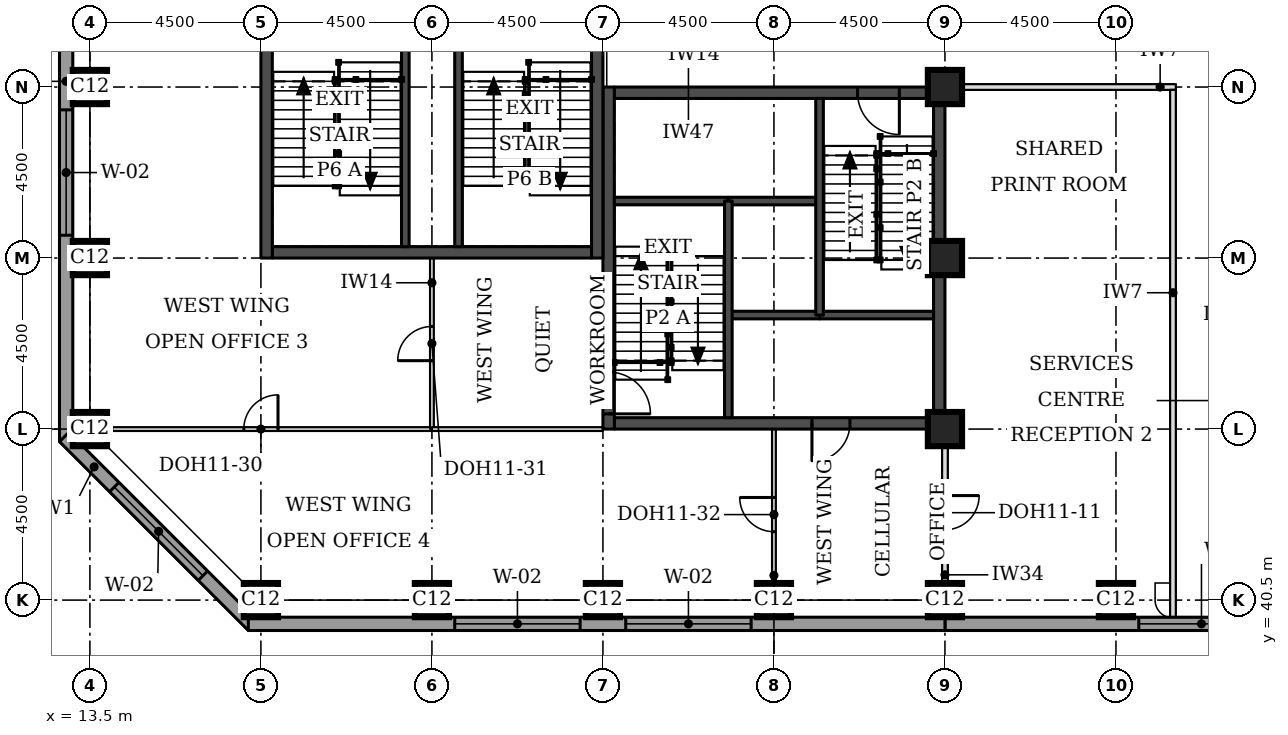
"""IFC4 building model, lengths in metres.
Left out: names, types, materials, properties, quantities, classifications, styles, units other than length and angle.
Written with IfcOpenShell. Run it as: python <this file> out.ifc"""

import sys

from ifc_helpers import new_model, si_unit, direction, frame, frame_2d, origin, origin_2d, place, context, subcontext, project, spatial, rectangle, extrude, element, fill, save


model = new_model("IFC4")
c1 = context("Model", 3, precision=1e-05, world=origin(), true_north=direction((0.0, 1.0)))
c2 = subcontext(c1, "Body", "Model", "MODEL_VIEW")
j1 = project(units=[si_unit("LENGTHUNIT", "METRE"), si_unit("PLANEANGLEUNIT", "RADIAN")], contexts=[c1])
p1 = place(None, origin())
s1 = spatial("IfcSite", under=j1, at=p1, CompositionType="ELEMENT")
p2 = place(p1, origin())
s2 = spatial("IfcBuilding", under=s1, at=p2, CompositionType="ELEMENT")
p3 = place(p2, frame((0.0, 0.0, 234.1)))
s3 = spatial("IfcBuildingStorey", under=s2, at=p3, CompositionType="ELEMENT", Elevation=234.1)
for number, where, z_axis, x_axis in (
    (1, (18.0, 40.5, 0.0), (0.0, 0.0, 1.0), (1.0, 0.0, 0.0)),
    (2, (22.5, 40.5, 0.0), (0.0, 0.0, 1.0), (1.0, 0.0, 0.0)),
    (3, (27.0, 40.5, 0.0), (0.0, 0.0, 1.0), (1.0, 0.0, 0.0)),
    (4, (31.5, 40.5, 0.0), (0.0, 0.0, 1.0), (1.0, 0.0, 0.0)),
    (5, (36.0, 40.5, 0.0), (0.0, 0.0, 1.0), (1.0, 0.0, 0.0)),
    (6, (40.5, 40.5, 0.0), (0.0, 0.0, 1.0), (1.0, 0.0, 0.0)),
    (7, (13.5, 45.0, 0.0), (0.0, 0.0, 1.0), (1.0, 0.0, 0.0)),
    (8, (36.0, 45.0, 0.0), (0.0, 0.0, 1.0), (1.0, 0.0, 0.0)),
    (9, (13.5, 49.5, 0.0), (0.0, 0.0, 1.0), (1.0, 0.0, 0.0)),
    (10, (36.0, 49.5, 0.0), (0.0, 0.0, 1.0), (1.0, 0.0, 0.0)),
    (11, (13.5, 54.0, 0.0), (0.0, 0.0, 1.0), (1.0, 0.0, 0.0)),
    (12, (36.0, 54.0, 0.0), (0.0, 0.0, 1.0), (1.0, 0.0, 0.0)),
):
    element("IfcColumn", number, at=place(p3, frame(where, z_axis=z_axis, x_axis=x_axis)), inside=s3, PredefinedType="COLUMN", context=c2, shape_type="SweptSolid", body=[
        extrude(rectangle(XDim=0.9, YDim=0.9, at=origin_2d()), origin(), (0.0, 0.0, 1.0), 3.7),
    ])
p4 = place(p3, frame((27.3, 45.15, 0.0), z_axis=(0.0, 0.0, 1.0), x_axis=(1.0, 0.0, 0.0)))
e13 = element("IfcWall", 13, at=p4, inside=s3, PredefinedType="SHEAR", context=c2, shape_type="SweptSolid", body=[
    extrude(rectangle(XDim=8.4, YDim=0.3, at=frame_2d((4.2, 0.0))), origin(), (0.0, 0.0, 1.0), 3.7),
])
p5 = place(p4, frame((5.2, 0.0, 0.0)))
e14 = element("IfcOpeningElement", 14, at=p5, cuts=e13, PredefinedType="OPENING", context=c2, shape_type="SweptSolid", body=[
    extrude(rectangle(XDim=1.0, YDim=2.1, at=frame_2d((0.5, 1.05))), frame((0.0, 0.16, 0.0), z_axis=(0.0, -1.0, 0.0), x_axis=(1.0, 0.0, 0.0)), (0.0, 0.0, 1.0), 0.32),
])
p6 = place(p3, frame((27.3, 53.85, 0.0), z_axis=(0.0, 0.0, 1.0), x_axis=(1.0, 0.0, 0.0)))
e15 = element("IfcWall", 15, at=p6, inside=s3, PredefinedType="SHEAR", context=c2, shape_type="SweptSolid", body=[
    extrude(rectangle(XDim=8.4, YDim=0.3, at=frame_2d((4.2, 0.0))), origin(), (0.0, 0.0, 1.0), 3.7),
])
p7 = place(p6, frame((6.4, 0.0, 0.0)))
e16 = element("IfcOpeningElement", 16, at=p7, cuts=e15, PredefinedType="OPENING", context=c2, shape_type="SweptSolid", body=[
    extrude(rectangle(XDim=1.1, YDim=2.1, at=frame_2d((0.55, 1.05))), frame((0.0, 0.16, 0.0), z_axis=(0.0, -1.0, 0.0), x_axis=(1.0, 0.0, 0.0)), (0.0, 0.0, 1.0), 0.32),
])
p8 = place(p3, frame((27.15, 45.0, 0.0), z_axis=(0.0, 0.0, 1.0), x_axis=(0.0, 1.0, 0.0)))
e17 = element("IfcWall", 17, at=p8, inside=s3, PredefinedType="SHEAR", context=c2, shape_type="SweptSolid", body=[
    extrude(rectangle(XDim=9.0, YDim=0.3, at=frame_2d((4.5, 0.0))), origin(), (0.0, 0.0, 1.0), 3.7),
])
p9 = place(p8, frame((0.4, 0.0, 0.0)))
e18 = element("IfcOpeningElement", 18, at=p9, cuts=e17, PredefinedType="OPENING", context=c2, shape_type="SweptSolid", body=[
    extrude(rectangle(XDim=1.1, YDim=2.1, at=frame_2d((0.55, 1.05))), frame((0.0, 0.16, 0.0), z_axis=(0.0, -1.0, 0.0), x_axis=(1.0, 0.0, 0.0)), (0.0, 0.0, 1.0), 0.32),
])
p10 = place(p3, frame((35.85, 45.0, 0.0), z_axis=(0.0, 0.0, 1.0), x_axis=(0.0, 1.0, 0.0)))
e19 = element("IfcWall", 19, at=p10, inside=s3, PredefinedType="SHEAR", context=c2, shape_type="SweptSolid", body=[
    extrude(rectangle(XDim=9.0, YDim=0.3, at=frame_2d((4.5, 0.0))), origin(), (0.0, 0.0, 1.0), 3.7),
])
p11 = place(p3, frame((18.3, 49.65, 0.0), z_axis=(0.0, 0.0, 1.0), x_axis=(1.0, 0.0, 0.0)))
e20 = element("IfcWall", 20, at=p11, inside=s3, PredefinedType="SHEAR", context=c2, shape_type="SweptSolid", body=[
    extrude(rectangle(XDim=8.4, YDim=0.3, at=frame_2d((4.2, 0.0))), origin(), (0.0, 0.0, 1.0), 3.7),
])
p12 = place(p3, frame((18.15, 49.5, 0.0), z_axis=(0.0, 0.0, 1.0), x_axis=(0.0, 1.0, 0.0)))
e21 = element("IfcWall", 21, at=p12, inside=s3, PredefinedType="SHEAR", context=c2, shape_type="SweptSolid", body=[
    extrude(rectangle(XDim=9.0, YDim=0.3, at=frame_2d((4.5, 0.0))), origin(), (0.0, 0.0, 1.0), 3.7),
])
p13 = place(p3, frame((26.85, 49.5, 0.0), z_axis=(0.0, 0.0, 1.0), x_axis=(0.0, 1.0, 0.0)))
e22 = element("IfcWall", 22, at=p13, inside=s3, PredefinedType="SHEAR", context=c2, shape_type="SweptSolid", body=[
    extrude(rectangle(XDim=9.0, YDim=0.3, at=frame_2d((4.5, 0.0))), origin(), (0.0, 0.0, 1.0), 3.7),
])
p14 = place(p13, frame((6.6, 0.0, 0.0)))
e23 = element("IfcOpeningElement", 23, at=p14, cuts=e22, PredefinedType="OPENING", context=c2, shape_type="SweptSolid", body=[
    extrude(rectangle(XDim=1.8, YDim=2.1, at=frame_2d((0.9, 1.05))), frame((0.0, 0.16, 0.0), z_axis=(0.0, -1.0, 0.0), x_axis=(1.0, 0.0, 0.0)), (0.0, 0.0, 1.0), 0.32),
])
p15 = place(p3, frame((36.0, 39.875, 0.0), z_axis=(0.0, 0.0, 1.0), x_axis=(1.0, 0.0, 0.0)))
e24 = element("IfcWall", 24, at=p15, inside=s3, PredefinedType="STANDARD", context=c2, shape_type="SweptSolid", body=[
    extrude(rectangle(XDim=36.331, YDim=0.35, at=frame_2d((18.166, 0.0))), origin(), (0.0, 0.0, 1.0), 3.525),
])
p16 = place(p15, frame((5.1, 0.0, 0.9)))
e25 = element("IfcOpeningElement", 25, at=p16, cuts=e24, PredefinedType="OPENING", context=c2, shape_type="SweptSolid", body=[
    extrude(rectangle(XDim=3.3, YDim=1.9, at=frame_2d((1.65, 0.95))), frame((0.0, 0.185, 0.0), z_axis=(0.0, -1.0, 0.0), x_axis=(1.0, 0.0, 0.0)), (0.0, 0.0, 1.0), 0.37),
])
p17 = place(p15, frame((9.6, 0.0, 0.9)))
e26 = element("IfcOpeningElement", 26, at=p17, cuts=e24, PredefinedType="OPENING", context=c2, shape_type="SweptSolid", body=[
    extrude(rectangle(XDim=3.3, YDim=1.9, at=frame_2d((1.65, 0.95))), frame((0.0, 0.185, 0.0), z_axis=(0.0, -1.0, 0.0), x_axis=(1.0, 0.0, 0.0)), (0.0, 0.0, 1.0), 0.37),
])
p18 = place(p15, frame((14.1, 0.0, 0.9)))
e27 = element("IfcOpeningElement", 27, at=p18, cuts=e24, PredefinedType="OPENING", context=c2, shape_type="SweptSolid", body=[
    extrude(rectangle(XDim=3.3, YDim=1.9, at=frame_2d((1.65, 0.95))), frame((0.0, 0.185, 0.0), z_axis=(0.0, -1.0, 0.0), x_axis=(1.0, 0.0, 0.0)), (0.0, 0.0, 1.0), 0.37),
])
p19 = place(p15, frame((18.6, 0.0, 0.9)))
e28 = element("IfcOpeningElement", 28, at=p19, cuts=e24, PredefinedType="OPENING", context=c2, shape_type="SweptSolid", body=[
    extrude(rectangle(XDim=3.3, YDim=1.9, at=frame_2d((1.65, 0.95))), frame((0.0, 0.185, 0.0), z_axis=(0.0, -1.0, 0.0), x_axis=(1.0, 0.0, 0.0)), (0.0, 0.0, 1.0), 0.37),
])
p20 = place(p15, frame((23.1, 0.0, 0.9)))
e29 = element("IfcOpeningElement", 29, at=p20, cuts=e24, PredefinedType="OPENING", context=c2, shape_type="SweptSolid", body=[
    extrude(rectangle(XDim=3.3, YDim=1.9, at=frame_2d((1.65, 0.95))), frame((0.0, 0.185, 0.0), z_axis=(0.0, -1.0, 0.0), x_axis=(1.0, 0.0, 0.0)), (0.0, 0.0, 1.0), 0.37),
])
p21 = place(p15, frame((27.6, 0.0, 0.9)))
e30 = element("IfcOpeningElement", 30, at=p21, cuts=e24, PredefinedType="OPENING", context=c2, shape_type="SweptSolid", body=[
    extrude(rectangle(XDim=3.3, YDim=1.9, at=frame_2d((1.65, 0.95))), frame((0.0, 0.185, 0.0), z_axis=(0.0, -1.0, 0.0), x_axis=(1.0, 0.0, 0.0)), (0.0, 0.0, 1.0), 0.37),
])
p22 = place(p3, frame((12.875, 58.831, 0.0), z_axis=(0.0, 0.0, 1.0), x_axis=(0.0, -1.0, 0.0)))
e31 = element("IfcWall", 31, at=p22, inside=s3, PredefinedType="STANDARD", context=c2, shape_type="SweptSolid", body=[
    extrude(rectangle(XDim=14.163, YDim=0.35, at=frame_2d((7.081, 0.0))), origin(), (0.0, 0.0, 1.0), 3.525),
])
p23 = place(p22, frame((5.431, 0.0, 0.9)))
e32 = element("IfcOpeningElement", 32, at=p23, cuts=e31, PredefinedType="OPENING", context=c2, shape_type="SweptSolid", body=[
    extrude(rectangle(XDim=3.3, YDim=1.9, at=frame_2d((1.65, 0.95))), frame((0.0, 0.185, 0.0), z_axis=(0.0, -1.0, 0.0), x_axis=(1.0, 0.0, 0.0)), (0.0, 0.0, 1.0), 0.37),
])
p24 = place(p3, frame((12.824, 44.792, 0.0), z_axis=(0.0, 0.0, 1.0), x_axis=(0.707106781187, -0.707106781187, 0.0)))
e33 = element("IfcWall", 33, at=p24, inside=s3, PredefinedType="STANDARD", context=c2, shape_type="SweptSolid", body=[
    extrude(rectangle(XDim=7.027, YDim=0.35, at=frame_2d((3.513, 0.0))), origin(), (0.0, 0.0, 1.0), 3.525),
])
p25 = place(p24, frame((1.863, 0.0, 0.9)))
e34 = element("IfcOpeningElement", 34, at=p25, cuts=e33, PredefinedType="OPENING", context=c2, shape_type="SweptSolid", body=[
    extrude(rectangle(XDim=3.3, YDim=1.9, at=frame_2d((1.65, 0.95))), frame((0.0, 0.185, 0.0), z_axis=(0.0, -1.0, 0.0), x_axis=(1.0, 0.0, 0.0)), (0.0, 0.0, 1.0), 0.37),
])
p26 = place(p3, frame((17.669, 39.875, 0.0), z_axis=(0.0, 0.0, 1.0), x_axis=(1.0, 0.0, 0.0)))
e35 = element("IfcWall", 35, at=p26, inside=s3, PredefinedType="STANDARD", context=c2, shape_type="SweptSolid", body=[
    extrude(rectangle(XDim=18.331, YDim=0.35, at=frame_2d((9.166, 0.0))), origin(), (0.0, 0.0, 1.0), 3.525),
])
p27 = place(p26, frame((5.431, 0.0, 0.9)))
e36 = element("IfcOpeningElement", 36, at=p27, cuts=e35, PredefinedType="OPENING", context=c2, shape_type="SweptSolid", body=[
    extrude(rectangle(XDim=3.3, YDim=1.9, at=frame_2d((1.65, 0.95))), frame((0.0, 0.185, 0.0), z_axis=(0.0, -1.0, 0.0), x_axis=(1.0, 0.0, 0.0)), (0.0, 0.0, 1.0), 0.37),
])
p28 = place(p26, frame((9.931, 0.0, 0.9)))
e37 = element("IfcOpeningElement", 37, at=p28, cuts=e35, PredefinedType="OPENING", context=c2, shape_type="SweptSolid", body=[
    extrude(rectangle(XDim=3.3, YDim=1.9, at=frame_2d((1.65, 0.95))), frame((0.0, 0.185, 0.0), z_axis=(0.0, -1.0, 0.0), x_axis=(1.0, 0.0, 0.0)), (0.0, 0.0, 1.0), 0.37),
])
p29 = place(p3, frame((36.45, 54.0, 0.0), z_axis=(0.0, 0.0, 1.0), x_axis=(1.0, 0.0, 0.0)))
e38 = element("IfcWall", 38, at=p29, inside=s3, PredefinedType="PARTITIONING", context=c2, shape_type="SweptSolid", body=[
    extrude(rectangle(XDim=5.625, YDim=0.15, at=frame_2d((2.812, 0.0))), origin(), (0.0, 0.0, 1.0), 3.55),
])
p30 = place(p3, frame((42.0, 40.05, 0.0), z_axis=(0.0, 0.0, 1.0), x_axis=(0.0, 1.0, 0.0)))
e39 = element("IfcWall", 39, at=p30, inside=s3, PredefinedType="PARTITIONING", context=c2, shape_type="SweptSolid", body=[
    extrude(rectangle(XDim=13.875, YDim=0.15, at=frame_2d((6.938, 0.0))), origin(), (0.0, 0.0, 1.0), 3.55),
])
p31 = place(p3, frame((36.0, 40.95, 0.0), z_axis=(0.0, 0.0, 1.0), x_axis=(0.0, 1.0, 0.0)))
e40 = element("IfcWall", 40, at=p31, inside=s3, PredefinedType="PARTITIONING", context=c2, shape_type="SweptSolid", body=[
    extrude(rectangle(XDim=3.63, YDim=0.15, at=frame_2d((1.815, 0.0))), origin(), (0.0, 0.0, 1.0), 2.8),
])
p32 = place(p31, frame((1.4, 0.0, 0.0)))
e41 = element("IfcOpeningElement", 41, at=p32, cuts=e40, PredefinedType="OPENING", context=c2, shape_type="SweptSolid", body=[
    extrude(rectangle(XDim=0.9, YDim=2.1, at=frame_2d((0.45, 1.05))), frame((0.0, 0.085, 0.0), z_axis=(0.0, -1.0, 0.0), x_axis=(1.0, 0.0, 0.0)), (0.0, 0.0, 1.0), 0.17),
])
p33 = place(p3, frame((22.5, 45.0, 0.0), z_axis=(0.0, 0.0, 1.0), x_axis=(-1.0, 0.0, 0.0)))
e42 = element("IfcWall", 42, at=p33, inside=s3, PredefinedType="PARTITIONING", context=c2, shape_type="SweptSolid", body=[
    extrude(rectangle(XDim=9.0, YDim=0.1, at=frame_2d((4.5, 0.0))), origin(), (0.0, 0.0, 1.0), 2.55),
])
p34 = place(p33, frame((4.05, 0.0, 0.0)))
e43 = element("IfcOpeningElement", 43, at=p34, cuts=e42, PredefinedType="OPENING", context=c2, shape_type="SweptSolid", body=[
    extrude(rectangle(XDim=0.9, YDim=2.1, at=frame_2d((0.45, 1.05))), frame((0.0, 0.06, 0.0), z_axis=(0.0, -1.0, 0.0), x_axis=(1.0, 0.0, 0.0)), (0.0, 0.0, 1.0), 0.12),
])
p35 = place(p3, frame((22.5, 49.5, 0.0), z_axis=(0.0, 0.0, 1.0), x_axis=(0.0, -1.0, 0.0)))
e44 = element("IfcWall", 44, at=p35, inside=s3, PredefinedType="PARTITIONING", context=c2, shape_type="SweptSolid", body=[
    extrude(rectangle(XDim=4.5, YDim=0.1, at=frame_2d((2.25, 0.0))), origin(), (0.0, 0.0, 1.0), 3.55),
])
p36 = place(p35, frame((1.8, 0.0, 0.0)))
e45 = element("IfcOpeningElement", 45, at=p36, cuts=e44, PredefinedType="OPENING", context=c2, shape_type="SweptSolid", body=[
    extrude(rectangle(XDim=0.9, YDim=2.1, at=frame_2d((0.45, 1.05))), frame((0.0, 0.06, 0.0), z_axis=(0.0, -1.0, 0.0), x_axis=(1.0, 0.0, 0.0)), (0.0, 0.0, 1.0), 0.12),
])
p37 = place(p3, frame((22.5, 45.0, 0.0), z_axis=(0.0, 0.0, 1.0), x_axis=(1.0, 0.0, 0.0)))
e46 = element("IfcWall", 46, at=p37, inside=s3, PredefinedType="PARTITIONING", context=c2, shape_type="SweptSolid", body=[
    extrude(rectangle(XDim=4.5, YDim=0.1, at=frame_2d((2.25, 0.0))), origin(), (0.0, 0.0, 1.0), 2.55),
])
p38 = place(p3, frame((31.5, 45.0, 0.0), z_axis=(0.0, 0.0, 1.0), x_axis=(0.0, -1.0, 0.0)))
e47 = element("IfcWall", 47, at=p38, inside=s3, PredefinedType="PARTITIONING", context=c2, shape_type="SweptSolid", body=[
    extrude(rectangle(XDim=4.5, YDim=0.1, at=frame_2d((2.25, 0.0))), origin(), (0.0, 0.0, 1.0), 3.55),
])
p39 = place(p38, frame((1.8, 0.0, 0.0)))
e48 = element("IfcOpeningElement", 48, at=p39, cuts=e47, PredefinedType="OPENING", context=c2, shape_type="SweptSolid", body=[
    extrude(rectangle(XDim=0.9, YDim=2.1, at=frame_2d((0.45, 1.05))), frame((0.0, 0.06, 0.0), z_axis=(0.0, -1.0, 0.0), x_axis=(1.0, 0.0, 0.0)), (0.0, 0.0, 1.0), 0.12),
])
p40 = place(p3, frame((30.3, 48.0, 0.0), z_axis=(0.0, 0.0, 1.0), x_axis=(1.0, 0.0, 0.0)))
e49 = element("IfcWall", 49, at=p40, inside=s3, PredefinedType="SOLIDWALL", context=c2, shape_type="SweptSolid", body=[
    extrude(rectangle(XDim=2.4, YDim=0.2, at=frame_2d((1.2, 0.0))), origin(), (0.0, 0.0, 1.0), 3.55),
])
p41 = place(p3, frame((32.7, 48.0, 0.0), z_axis=(0.0, 0.0, 1.0), x_axis=(1.0, 0.0, 0.0)))
e50 = element("IfcWall", 50, at=p41, inside=s3, PredefinedType="SOLIDWALL", context=c2, shape_type="SweptSolid", body=[
    extrude(rectangle(XDim=3.0, YDim=0.2, at=frame_2d((1.5, 0.0))), origin(), (0.0, 0.0, 1.0), 3.55),
])
p42 = place(p3, frame((30.3, 51.0, 0.0), z_axis=(0.0, 0.0, 1.0), x_axis=(1.0, 0.0, 0.0)))
e51 = element("IfcWall", 51, at=p42, inside=s3, PredefinedType="SOLIDWALL", context=c2, shape_type="SweptSolid", body=[
    extrude(rectangle(XDim=2.4, YDim=0.2, at=frame_2d((1.2, 0.0))), origin(), (0.0, 0.0, 1.0), 3.7),
])
p43 = place(p3, frame((27.3, 51.0, 0.0), z_axis=(0.0, 0.0, 1.0), x_axis=(1.0, 0.0, 0.0)))
e52 = element("IfcWall", 52, at=p43, inside=s3, PredefinedType="SOLIDWALL", context=c2, shape_type="SweptSolid", body=[
    extrude(rectangle(XDim=3.0, YDim=0.2, at=frame_2d((1.5, 0.0))), origin(), (0.0, 0.0, 1.0), 3.55),
])
for number, where, z_axis, x_axis in (
    (53, (30.3, 45.3, 0.0), (0.0, 0.0, 1.0), (0.0, 1.0, 0.0)),
    (54, (32.7, 48.0, 0.0), (0.0, 0.0, 1.0), (0.0, 1.0, 0.0)),
):
    element("IfcWall", number, at=place(p3, frame(where, z_axis=z_axis, x_axis=x_axis)), inside=s3, PredefinedType="SOLIDWALL", context=c2, shape_type="SweptSolid", body=[
        extrude(rectangle(XDim=5.7, YDim=0.2, at=frame_2d((2.85, 0.0))), origin(), (0.0, 0.0, 1.0), 3.55),
    ])
for number, where, z_axis, x_axis in (
    (55, (21.8, 49.8, 0.0), (0.0, 0.0, 1.0), (0.0, 1.0, 0.0)),
    (56, (23.2, 49.8, 0.0), (0.0, 0.0, 1.0), (0.0, 1.0, 0.0)),
):
    element("IfcWall", number, at=place(p3, frame(where, z_axis=z_axis, x_axis=x_axis)), inside=s3, PredefinedType="SOLIDWALL", context=c2, shape_type="SweptSolid", body=[
        extrude(rectangle(XDim=6.05, YDim=0.2, at=frame_2d((3.025, 0.0))), origin(), (0.0, 0.0, 1.0), 3.55),
    ])
p44 = place(p16, origin())
e57 = element("IfcWindow", 57, at=p44, inside=s3, PartitioningType="SINGLE_PANEL", PredefinedType="WINDOW", context=c2, shape_type="SweptSolid", body=[
    extrude(rectangle(XDim=3.3, YDim=1.9, at=frame_2d((1.65, 0.95))), frame((0.0, 0.085, 0.0), z_axis=(0.0, -1.0, 0.0), x_axis=(1.0, 0.0, 0.0)), (0.0, 0.0, 1.0), 0.06),
])
fill(e25, e57)
p45 = place(p23, origin())
e58 = element("IfcWindow", 58, at=p45, inside=s3, PartitioningType="SINGLE_PANEL", PredefinedType="WINDOW", context=c2, shape_type="SweptSolid", body=[
    extrude(rectangle(XDim=3.3, YDim=1.9, at=frame_2d((1.65, 0.95))), frame((0.0, 0.085, 0.0), z_axis=(0.0, -1.0, 0.0), x_axis=(1.0, 0.0, 0.0)), (0.0, 0.0, 1.0), 0.06),
])
fill(e32, e58)
p46 = place(p25, origin())
e59 = element("IfcWindow", 59, at=p46, inside=s3, PartitioningType="SINGLE_PANEL", PredefinedType="WINDOW", context=c2, shape_type="SweptSolid", body=[
    extrude(rectangle(XDim=3.3, YDim=1.9, at=frame_2d((1.65, 0.95))), frame((0.0, 0.085, 0.0), z_axis=(0.0, -1.0, 0.0), x_axis=(1.0, 0.0, 0.0)), (0.0, 0.0, 1.0), 0.06),
])
fill(e34, e59)
p47 = place(p27, origin())
e60 = element("IfcWindow", 60, at=p47, inside=s3, PartitioningType="SINGLE_PANEL", PredefinedType="WINDOW", context=c2, shape_type="SweptSolid", body=[
    extrude(rectangle(XDim=3.3, YDim=1.9, at=frame_2d((1.65, 0.95))), frame((0.0, 0.085, 0.0), z_axis=(0.0, -1.0, 0.0), x_axis=(1.0, 0.0, 0.0)), (0.0, 0.0, 1.0), 0.06),
])
fill(e36, e60)
p48 = place(p28, origin())
e61 = element("IfcWindow", 61, at=p48, inside=s3, PartitioningType="SINGLE_PANEL", PredefinedType="WINDOW", context=c2, shape_type="SweptSolid", body=[
    extrude(rectangle(XDim=3.3, YDim=1.9, at=frame_2d((1.65, 0.95))), frame((0.0, 0.085, 0.0), z_axis=(0.0, -1.0, 0.0), x_axis=(1.0, 0.0, 0.0)), (0.0, 0.0, 1.0), 0.06),
])
fill(e37, e61)
p49 = place(p32, frame((0.9, 0.0, 0.0), z_axis=(0.0, 0.0, 1.0), x_axis=(-1.0, 0.0, 0.0)))
e62 = element("IfcDoor", 62, at=p49, inside=s3, OperationType="SINGLE_SWING_LEFT", PredefinedType="DOOR", context=c2, shape_type="SweptSolid", body=[
    extrude(rectangle(XDim=0.9, YDim=2.1, at=frame_2d((0.45, 1.05))), frame((0.0, 0.025, 0.0), z_axis=(0.0, -1.0, 0.0), x_axis=(1.0, 0.0, 0.0)), (0.0, 0.0, 1.0), 0.05),
])
fill(e41, e62)
p50 = place(p34, frame((0.9, 0.0, 0.0), z_axis=(0.0, 0.0, 1.0), x_axis=(-1.0, 0.0, 0.0)))
e63 = element("IfcDoor", 63, at=p50, inside=s3, OperationType="SINGLE_SWING_RIGHT", PredefinedType="DOOR", context=c2, shape_type="SweptSolid", body=[
    extrude(rectangle(XDim=0.9, YDim=2.1, at=frame_2d((0.45, 1.05))), frame((0.0, 0.025, 0.0), z_axis=(0.0, -1.0, 0.0), x_axis=(1.0, 0.0, 0.0)), (0.0, 0.0, 1.0), 0.05),
])
fill(e43, e63)
p51 = place(p36, frame((0.9, 0.0, 0.0), z_axis=(0.0, 0.0, 1.0), x_axis=(-1.0, 0.0, 0.0)))
e64 = element("IfcDoor", 64, at=p51, inside=s3, OperationType="SINGLE_SWING_LEFT", PredefinedType="DOOR", context=c2, shape_type="SweptSolid", body=[
    extrude(rectangle(XDim=0.9, YDim=2.1, at=frame_2d((0.45, 1.05))), frame((0.0, 0.025, 0.0), z_axis=(0.0, -1.0, 0.0), x_axis=(1.0, 0.0, 0.0)), (0.0, 0.0, 1.0), 0.05),
])
fill(e45, e64)
p52 = place(p39, frame((0.9, 0.0, 0.0), z_axis=(0.0, 0.0, 1.0), x_axis=(-1.0, 0.0, 0.0)))
e65 = element("IfcDoor", 65, at=p52, inside=s3, OperationType="SINGLE_SWING_RIGHT", PredefinedType="DOOR", context=c2, shape_type="SweptSolid", body=[
    extrude(rectangle(XDim=0.9, YDim=2.1, at=frame_2d((0.45, 1.05))), frame((0.0, 0.025, 0.0), z_axis=(0.0, -1.0, 0.0), x_axis=(1.0, 0.0, 0.0)), (0.0, 0.0, 1.0), 0.05),
])
fill(e48, e65)
p53 = place(p9, frame((1.1, 0.0, 0.0), z_axis=(0.0, 0.0, 1.0), x_axis=(-1.0, 0.0, 0.0)))
e66 = element("IfcDoor", 66, at=p53, inside=s3, OperationType="SINGLE_SWING_RIGHT", PredefinedType="DOOR", context=c2, shape_type="SweptSolid", body=[
    extrude(rectangle(XDim=1.1, YDim=2.1, at=frame_2d((0.55, 1.05))), frame((0.0, 0.025, 0.0), z_axis=(0.0, -1.0, 0.0), x_axis=(1.0, 0.0, 0.0)), (0.0, 0.0, 1.0), 0.05),
])
fill(e18, e66)
p54 = place(p7, frame((1.1, 0.0, 0.0), z_axis=(0.0, 0.0, 1.0), x_axis=(-1.0, 0.0, 0.0)))
e67 = element("IfcDoor", 67, at=p54, inside=s3, OperationType="SINGLE_SWING_LEFT", PredefinedType="DOOR", context=c2, shape_type="SweptSolid", body=[
    extrude(rectangle(XDim=1.1, YDim=2.1, at=frame_2d((0.55, 1.05))), frame((0.0, 0.025, 0.0), z_axis=(0.0, -1.0, 0.0), x_axis=(1.0, 0.0, 0.0)), (0.0, 0.0, 1.0), 0.05),
])
fill(e16, e67)
p55 = place(p5, frame((1.0, 0.0, 0.0), z_axis=(0.0, 0.0, 1.0), x_axis=(-1.0, 0.0, 0.0)))
e68 = element("IfcDoor", 68, at=p55, inside=s3, OperationType="SINGLE_SWING_RIGHT", PredefinedType="DOOR", context=c2, shape_type="SweptSolid", body=[
    extrude(rectangle(XDim=1.0, YDim=2.1, at=frame_2d((0.5, 1.05))), frame((0.0, 0.025, 0.0), z_axis=(0.0, -1.0, 0.0), x_axis=(1.0, 0.0, 0.0)), (0.0, 0.0, 1.0), 0.05),
])
fill(e14, e68)
save(model, sys.argv[1])
